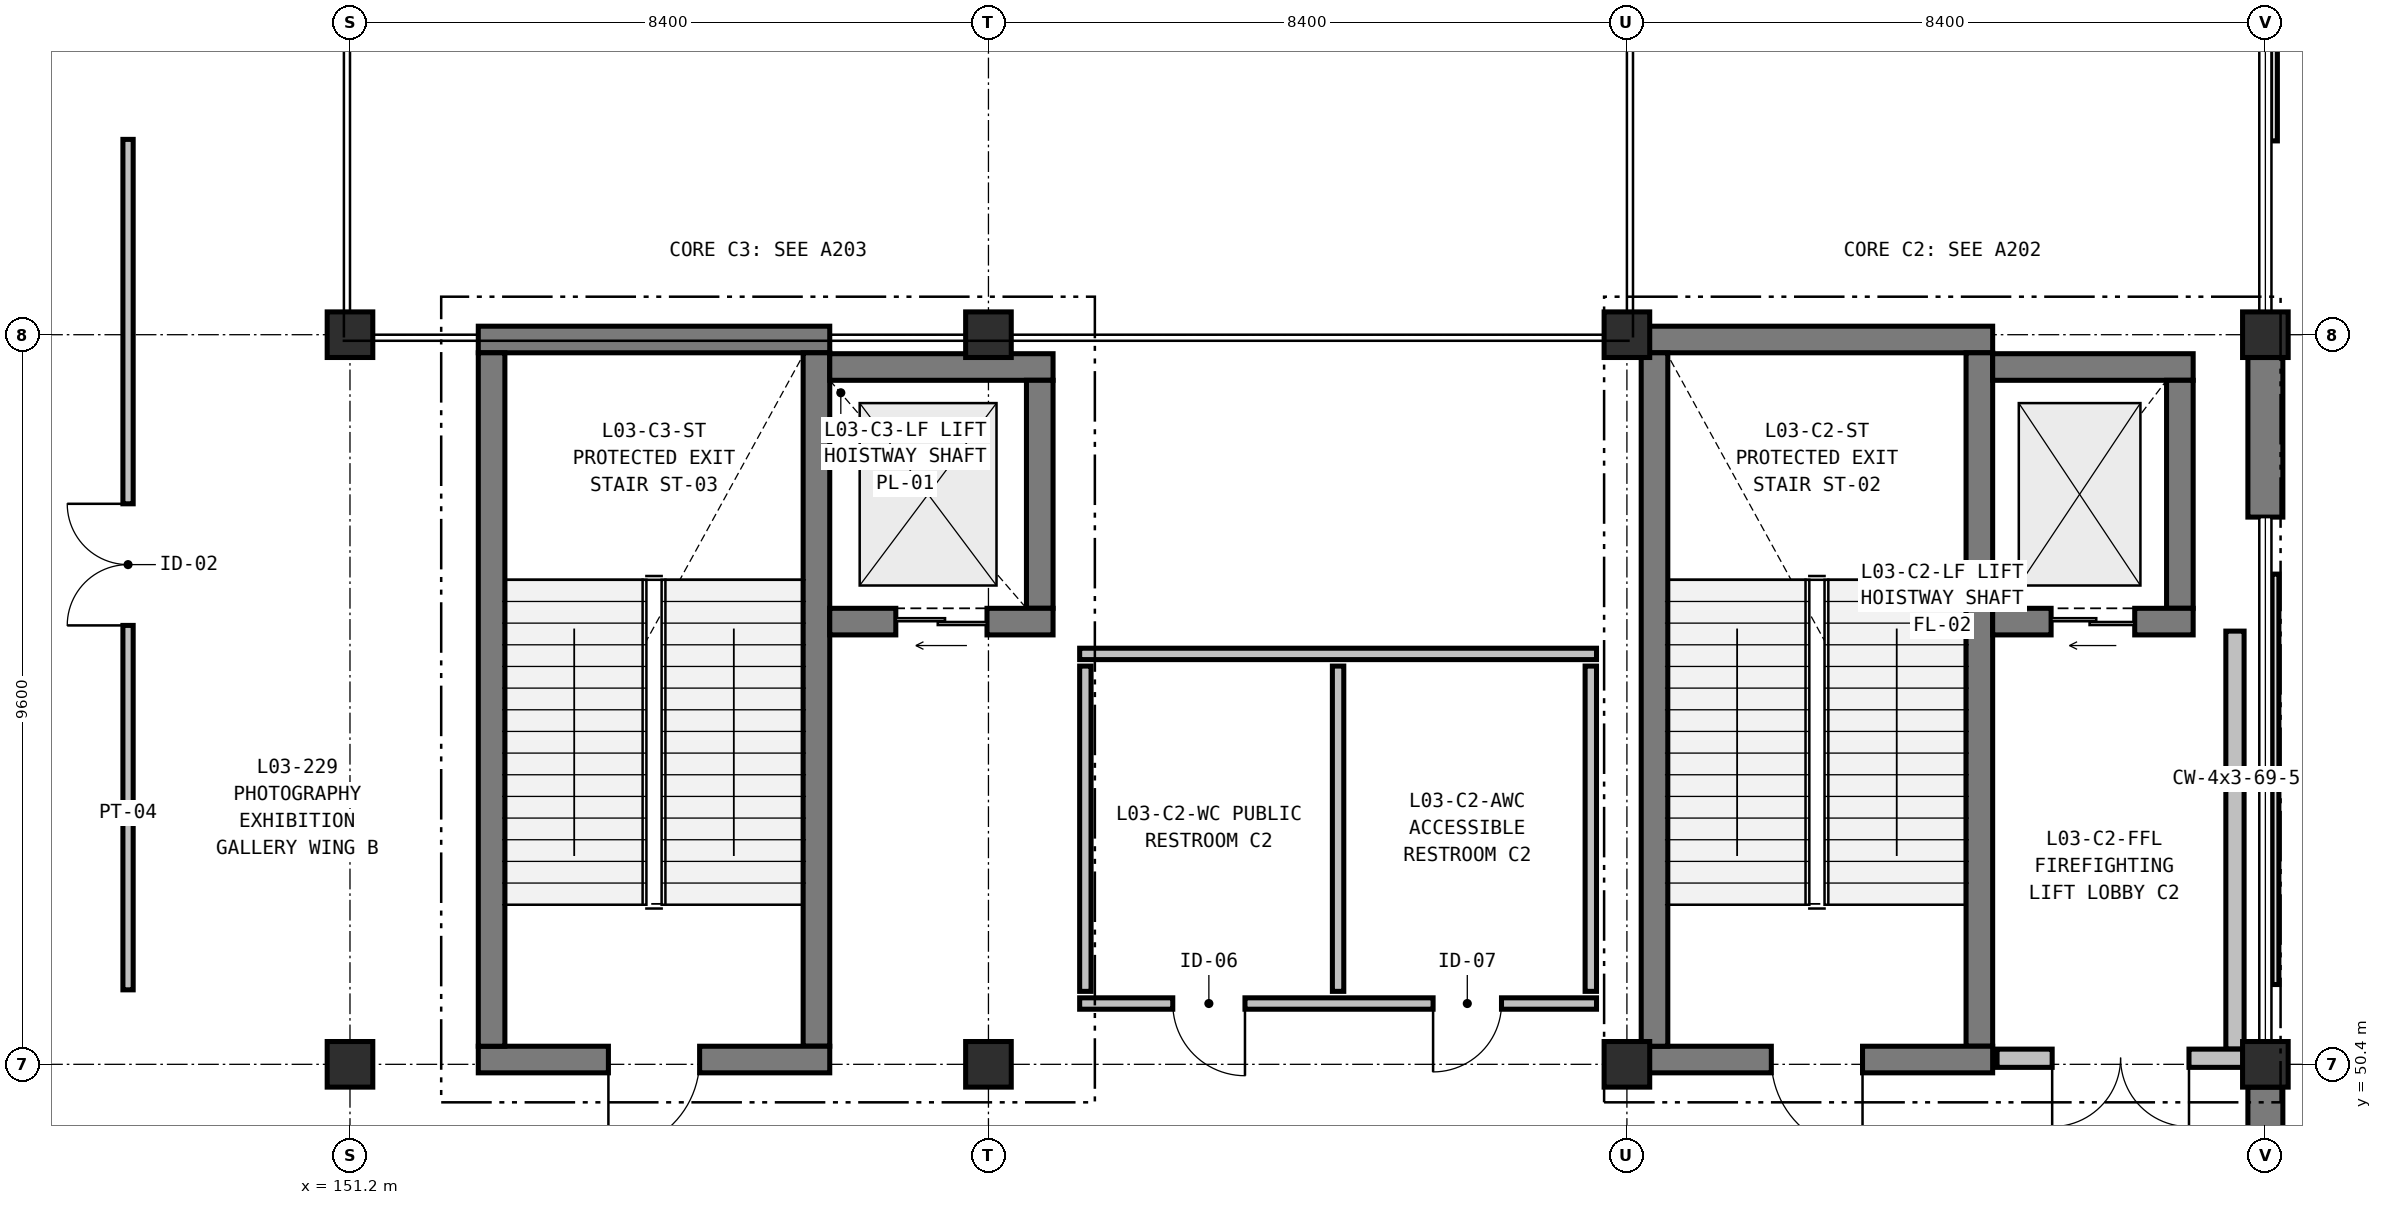
"""IFC4 building model, lengths in metres.
Left out: names, types, materials, properties, quantities, classifications, styles, units other than length and angle.
Written with IfcOpenShell. Run it as: python <this file> out.ifc"""

import sys

from ifc_helpers import new_model, si_unit, direction, frame, frame_2d, origin, origin_2d, place, context, subcontext, project, spatial, rectangle, extrude, element, fill, save


model = new_model("IFC4")
c1 = context("Model", 3, precision=1e-05, world=origin(), true_north=direction((0.0, 1.0)))
c2 = subcontext(c1, "Body", "Model", "MODEL_VIEW")
j1 = project(units=[si_unit("LENGTHUNIT", "METRE"), si_unit("PLANEANGLEUNIT", "RADIAN")], contexts=[c1])
p1 = place(None, origin())
s1 = spatial("IfcSite", under=j1, at=p1, CompositionType="ELEMENT")
p2 = place(p1, origin())
s2 = spatial("IfcBuilding", under=s1, at=p2, CompositionType="ELEMENT")
p3 = place(p2, frame((0.0, 0.0, 16.8)))
s3 = spatial("IfcBuildingStorey", under=s2, at=p3, CompositionType="ELEMENT", Elevation=16.8)
for number, where, z_axis, x_axis in (
    (1, (151.2, 50.4, 0.0), (0.0, 0.0, 1.0), (1.0, 0.0, 0.0)),
    (2, (151.2, 60.0, 0.0), (0.0, 0.0, 1.0), (1.0, 0.0, 0.0)),
    (3, (159.6, 50.4, 0.0), (0.0, 0.0, 1.0), (1.0, 0.0, 0.0)),
    (4, (159.6, 60.0, 0.0), (0.0, 0.0, 1.0), (1.0, 0.0, 0.0)),
    (5, (168.0, 50.4, 0.0), (0.0, 0.0, 1.0), (1.0, 0.0, 0.0)),
    (6, (168.0, 60.0, 0.0), (0.0, 0.0, 1.0), (1.0, 0.0, 0.0)),
    (7, (176.4, 50.4, 0.0), (0.0, 0.0, 1.0), (1.0, 0.0, 0.0)),
    (8, (176.4, 60.0, 0.0), (0.0, 0.0, 1.0), (1.0, 0.0, 0.0)),
):
    element("IfcColumn", number, at=place(p3, frame(where, z_axis=z_axis, x_axis=x_axis)), inside=s3, PredefinedType="COLUMN", context=c2, shape_type="SweptSolid", body=[
        extrude(rectangle(XDim=0.6, YDim=0.6, at=origin_2d()), origin(), (0.0, 0.0, 1.0), 5.4),
    ])
p4 = place(p3, frame((176.4, 59.7, 0.0), z_axis=(0.0, 0.0, 1.0), x_axis=(0.0, -1.0, 0.0)))
e9 = element("IfcWall", 9, at=p4, inside=s3, PredefinedType="SOLIDWALL", context=c2, shape_type="SweptSolid", body=[
    extrude(rectangle(XDim=2.1, YDim=0.46, at=frame_2d((1.05, 0.0))), origin(), (0.0, 0.0, 1.0), 5.1),
])
p5 = place(p3, frame((176.4, 50.1, 0.0), z_axis=(0.0, 0.0, 1.0), x_axis=(0.0, -1.0, 0.0)))
e10 = element("IfcWall", 10, at=p5, inside=s3, PredefinedType="SOLIDWALL", context=c2, shape_type="SweptSolid", body=[
    extrude(rectangle(XDim=4.2, YDim=0.46, at=frame_2d((2.1, 0.0))), origin(), (0.0, 0.0, 1.0), 5.1),
])
p6 = place(p3, frame((168.188, 59.937, 0.0), z_axis=(0.0, 0.0, 1.0), x_axis=(1.0, 0.0, 0.0)))
e11 = element("IfcWall", 11, at=p6, inside=s3, PredefinedType="SHEAR", context=c2, shape_type="SweptSolid", body=[
    extrude(rectangle(XDim=4.624, YDim=0.35, at=frame_2d((2.312, 0.0))), origin(), (0.0, 0.0, 1.0), 5.1),
])
p7 = place(p3, frame((172.637, 59.762, 0.0), z_axis=(0.0, 0.0, 1.0), x_axis=(0.0, -1.0, 0.0)))
e12 = element("IfcWall", 12, at=p7, inside=s3, PredefinedType="SHEAR", context=c2, shape_type="SweptSolid", body=[
    extrude(rectangle(XDim=9.124, YDim=0.35, at=frame_2d((4.562, 0.0))), origin(), (0.0, 0.0, 1.0), 5.1),
])
p8 = place(p3, frame((172.812, 50.463, 0.0), z_axis=(0.0, 0.0, 1.0), x_axis=(-1.0, 0.0, 0.0)))
e13 = element("IfcWall", 13, at=p8, inside=s3, PredefinedType="SHEAR", context=c2, shape_type="SweptSolid", body=[
    extrude(rectangle(XDim=4.624, YDim=0.35, at=frame_2d((2.312, 0.0))), origin(), (0.0, 0.0, 1.0), 5.1),
])
p9 = place(p8, frame((1.712, 0.0, 0.0)))
e14 = element("IfcOpeningElement", 14, at=p9, cuts=e13, PredefinedType="OPENING", context=c2, shape_type="SweptSolid", body=[
    extrude(rectangle(XDim=1.2, YDim=2.2, at=frame_2d((0.6, 1.1))), frame((0.0, 0.185, 0.0), z_axis=(0.0, -1.0, 0.0), x_axis=(1.0, 0.0, 0.0)), (0.0, 0.0, 1.0), 0.37),
])
p10 = place(p3, frame((168.363, 50.638, 0.0), z_axis=(0.0, 0.0, 1.0), x_axis=(0.0, 1.0, 0.0)))
e15 = element("IfcWall", 15, at=p10, inside=s3, PredefinedType="SHEAR", context=c2, shape_type="SweptSolid", body=[
    extrude(rectangle(XDim=9.124, YDim=0.35, at=frame_2d((4.562, 0.0))), origin(), (0.0, 0.0, 1.0), 5.1),
])
p11 = place(p3, frame((172.812, 59.575, 0.0), z_axis=(0.0, 0.0, 1.0), x_axis=(1.0, 0.0, 0.0)))
e16 = element("IfcWall", 16, at=p11, inside=s3, PredefinedType="SHEAR", context=c2, shape_type="SweptSolid", body=[
    extrude(rectangle(XDim=2.638, YDim=0.35, at=frame_2d((1.319, 0.0))), origin(), (0.0, 0.0, 1.0), 5.1),
])
p12 = place(p3, frame((175.275, 59.4, 0.0), z_axis=(0.0, 0.0, 1.0), x_axis=(0.0, -1.0, 0.0)))
e17 = element("IfcWall", 17, at=p12, inside=s3, PredefinedType="SHEAR", context=c2, shape_type="SweptSolid", body=[
    extrude(rectangle(XDim=3.0, YDim=0.35, at=frame_2d((1.5, 0.0))), origin(), (0.0, 0.0, 1.0), 5.1),
])
p13 = place(p3, frame((175.45, 56.225, 0.0), z_axis=(0.0, 0.0, 1.0), x_axis=(-1.0, 0.0, 0.0)))
e18 = element("IfcWall", 18, at=p13, inside=s3, PredefinedType="SHEAR", context=c2, shape_type="SweptSolid", body=[
    extrude(rectangle(XDim=2.638, YDim=0.35, at=frame_2d((1.319, 0.0))), origin(), (0.0, 0.0, 1.0), 5.1),
])
p14 = place(p13, frame((0.769, 0.0, 0.0)))
e19 = element("IfcOpeningElement", 19, at=p14, cuts=e18, PredefinedType="OPENING", context=c2, shape_type="SweptSolid", body=[
    extrude(rectangle(XDim=1.1, YDim=2.2, at=frame_2d((0.55, 1.1))), frame((0.0, 0.185, 0.0), z_axis=(0.0, -1.0, 0.0), x_axis=(1.0, 0.0, 0.0)), (0.0, 0.0, 1.0), 0.37),
])
p15 = place(p3, frame((176.0, 56.1, 0.0), z_axis=(0.0, 0.0, 1.0), x_axis=(0.0, -1.0, 0.0)))
e20 = element("IfcWall", 20, at=p15, inside=s3, PredefinedType="PARTITIONING", context=c2, shape_type="SweptSolid", body=[
    extrude(rectangle(XDim=5.5, YDim=0.24, at=frame_2d((2.75, 0.0))), origin(), (0.0, 0.0, 1.0), 4.425),
])
p16 = place(p3, frame((176.12, 50.48, 0.0), z_axis=(0.0, 0.0, 1.0), x_axis=(-1.0, 0.0, 0.0)))
e21 = element("IfcWall", 21, at=p16, inside=s3, PredefinedType="PARTITIONING", context=c2, shape_type="SweptSolid", body=[
    extrude(rectangle(XDim=3.25, YDim=0.24, at=frame_2d((1.625, 0.0))), origin(), (0.0, 0.0, 1.0), 4.425),
])
p17 = place(p16, frame((0.725, 0.0, 0.0)))
e22 = element("IfcOpeningElement", 22, at=p17, cuts=e21, PredefinedType="OPENING", context=c2, shape_type="SweptSolid", body=[
    extrude(rectangle(XDim=1.8, YDim=2.25, at=frame_2d((0.9, 1.125))), frame((0.0, 0.13, 0.0), z_axis=(0.0, -1.0, 0.0), x_axis=(1.0, 0.0, 0.0)), (0.0, 0.0, 1.0), 0.26),
])
p18 = place(p3, frame((167.6, 51.2, 0.0), z_axis=(0.0, 0.0, 1.0), x_axis=(-1.0, 0.0, 0.0)))
e23 = element("IfcWall", 23, at=p18, inside=s3, PredefinedType="PARTITIONING", context=c2, shape_type="SweptSolid", body=[
    extrude(rectangle(XDim=6.8, YDim=0.15, at=frame_2d((3.4, 0.0))), origin(), (0.0, 0.0, 1.0), 5.1),
])
p19 = place(p18, frame((1.25, 0.0, 0.0)))
e24 = element("IfcOpeningElement", 24, at=p19, cuts=e23, PredefinedType="OPENING", context=c2, shape_type="SweptSolid", body=[
    extrude(rectangle(XDim=0.9, YDim=2.1, at=frame_2d((0.45, 1.05))), frame((0.0, 0.085, 0.0), z_axis=(0.0, -1.0, 0.0), x_axis=(1.0, 0.0, 0.0)), (0.0, 0.0, 1.0), 0.17),
])
p20 = place(p18, frame((4.625, 0.0, 0.0)))
e25 = element("IfcOpeningElement", 25, at=p20, cuts=e23, PredefinedType="OPENING", context=c2, shape_type="SweptSolid", body=[
    extrude(rectangle(XDim=0.95, YDim=2.15, at=frame_2d((0.475, 1.075))), frame((0.0, 0.085, 0.0), z_axis=(0.0, -1.0, 0.0), x_axis=(1.0, 0.0, 0.0)), (0.0, 0.0, 1.0), 0.17),
])
p21 = place(p3, frame((160.8, 55.8, 0.0), z_axis=(0.0, 0.0, 1.0), x_axis=(1.0, 0.0, 0.0)))
e26 = element("IfcWall", 26, at=p21, inside=s3, PredefinedType="PARTITIONING", context=c2, shape_type="SweptSolid", body=[
    extrude(rectangle(XDim=6.8, YDim=0.15, at=frame_2d((3.4, 0.0))), origin(), (0.0, 0.0, 1.0), 5.1),
])
for number, where, z_axis, x_axis in (
    (27, (160.875, 51.36, 0.0), (0.0, 0.0, 1.0), (0.0, 1.0, 0.0)),
    (28, (164.2, 51.36, 0.0), (0.0, 0.0, 1.0), (0.0, 1.0, 0.0)),
    (29, (167.525, 51.36, 0.0), (0.0, 0.0, 1.0), (0.0, 1.0, 0.0)),
):
    element("IfcWall", number, at=place(p3, frame(where, z_axis=z_axis, x_axis=x_axis)), inside=s3, PredefinedType="PARTITIONING", context=c2, shape_type="SweptSolid", body=[
        extrude(rectangle(XDim=4.28, YDim=0.15, at=frame_2d((2.14, 0.0))), origin(), (0.0, 0.0, 1.0), 5.1),
    ])
p22 = place(p3, frame((152.888, 59.937, 0.0), z_axis=(0.0, 0.0, 1.0), x_axis=(1.0, 0.0, 0.0)))
e30 = element("IfcWall", 30, at=p22, inside=s3, PredefinedType="SHEAR", context=c2, shape_type="SweptSolid", body=[
    extrude(rectangle(XDim=4.624, YDim=0.35, at=frame_2d((2.312, 0.0))), origin(), (0.0, 0.0, 1.0), 5.1),
])
p23 = place(p3, frame((157.337, 59.762, 0.0), z_axis=(0.0, 0.0, 1.0), x_axis=(0.0, -1.0, 0.0)))
e31 = element("IfcWall", 31, at=p23, inside=s3, PredefinedType="SHEAR", context=c2, shape_type="SweptSolid", body=[
    extrude(rectangle(XDim=9.124, YDim=0.35, at=frame_2d((4.562, 0.0))), origin(), (0.0, 0.0, 1.0), 5.1),
])
p24 = place(p3, frame((157.512, 50.463, 0.0), z_axis=(0.0, 0.0, 1.0), x_axis=(-1.0, 0.0, 0.0)))
e32 = element("IfcWall", 32, at=p24, inside=s3, PredefinedType="SHEAR", context=c2, shape_type="SweptSolid", body=[
    extrude(rectangle(XDim=4.624, YDim=0.35, at=frame_2d((2.312, 0.0))), origin(), (0.0, 0.0, 1.0), 5.1),
])
p25 = place(p24, frame((1.712, 0.0, 0.0)))
e33 = element("IfcOpeningElement", 33, at=p25, cuts=e32, PredefinedType="OPENING", context=c2, shape_type="SweptSolid", body=[
    extrude(rectangle(XDim=1.2, YDim=2.2, at=frame_2d((0.6, 1.1))), frame((0.0, 0.185, 0.0), z_axis=(0.0, -1.0, 0.0), x_axis=(1.0, 0.0, 0.0)), (0.0, 0.0, 1.0), 0.37),
])
p26 = place(p3, frame((153.063, 50.638, 0.0), z_axis=(0.0, 0.0, 1.0), x_axis=(0.0, 1.0, 0.0)))
e34 = element("IfcWall", 34, at=p26, inside=s3, PredefinedType="SHEAR", context=c2, shape_type="SweptSolid", body=[
    extrude(rectangle(XDim=9.124, YDim=0.35, at=frame_2d((4.562, 0.0))), origin(), (0.0, 0.0, 1.0), 5.1),
])
p27 = place(p3, frame((157.512, 59.575, 0.0), z_axis=(0.0, 0.0, 1.0), x_axis=(1.0, 0.0, 0.0)))
e35 = element("IfcWall", 35, at=p27, inside=s3, PredefinedType="SHEAR", context=c2, shape_type="SweptSolid", body=[
    extrude(rectangle(XDim=2.938, YDim=0.35, at=frame_2d((1.469, 0.0))), origin(), (0.0, 0.0, 1.0), 5.1),
])
p28 = place(p3, frame((160.275, 59.4, 0.0), z_axis=(0.0, 0.0, 1.0), x_axis=(0.0, -1.0, 0.0)))
e36 = element("IfcWall", 36, at=p28, inside=s3, PredefinedType="SHEAR", context=c2, shape_type="SweptSolid", body=[
    extrude(rectangle(XDim=3.0, YDim=0.35, at=frame_2d((1.5, 0.0))), origin(), (0.0, 0.0, 1.0), 5.1),
])
p29 = place(p3, frame((160.45, 56.225, 0.0), z_axis=(0.0, 0.0, 1.0), x_axis=(-1.0, 0.0, 0.0)))
e37 = element("IfcWall", 37, at=p29, inside=s3, PredefinedType="SHEAR", context=c2, shape_type="SweptSolid", body=[
    extrude(rectangle(XDim=2.938, YDim=0.35, at=frame_2d((1.469, 0.0))), origin(), (0.0, 0.0, 1.0), 5.1),
])
p30 = place(p29, frame((0.869, 0.0, 0.0)))
e38 = element("IfcOpeningElement", 38, at=p30, cuts=e37, PredefinedType="OPENING", context=c2, shape_type="SweptSolid", body=[
    extrude(rectangle(XDim=1.2, YDim=2.2, at=frame_2d((0.6, 1.1))), frame((0.0, 0.185, 0.0), z_axis=(0.0, -1.0, 0.0), x_axis=(1.0, 0.0, 0.0)), (0.0, 0.0, 1.0), 0.37),
])
p31 = place(p3, frame((148.28, 51.38, 0.0), z_axis=(0.0, 0.0, 1.0), x_axis=(0.0, 1.0, 0.0)))
e39 = element("IfcWall", 39, at=p31, inside=s3, PredefinedType="PARTITIONING", context=c2, shape_type="SweptSolid", body=[
    extrude(rectangle(XDim=11.19, YDim=0.135, at=frame_2d((5.595, 0.0))), origin(), (0.0, 0.0, 1.0), 4.425),
])
p32 = place(p31, frame((4.795, 0.0, 0.0)))
e40 = element("IfcOpeningElement", 40, at=p32, cuts=e39, PredefinedType="OPENING", context=c2, shape_type="SweptSolid", body=[
    extrude(rectangle(XDim=1.6, YDim=2.35, at=frame_2d((0.8, 1.175))), frame((0.0, 0.077, 0.0), z_axis=(0.0, -1.0, 0.0), x_axis=(1.0, 0.0, 0.0)), (0.0, 0.0, 1.0), 0.155),
])
p33 = place(p9, origin())
e41 = element("IfcDoor", 41, at=p33, inside=s3, OperationType="SINGLE_SWING_LEFT", PredefinedType="DOOR", context=c2, shape_type="SweptSolid", body=[
    extrude(rectangle(XDim=1.2, YDim=2.2, at=frame_2d((0.6, 1.1))), frame((0.0, 0.025, 0.0), z_axis=(0.0, -1.0, 0.0), x_axis=(1.0, 0.0, 0.0)), (0.0, 0.0, 1.0), 0.05),
])
fill(e14, e41)
p34 = place(p14, origin())
e42 = element("IfcDoor", 42, at=p34, inside=s3, OperationType="DOUBLE_DOOR_SLIDING", PredefinedType="DOOR", context=c2, shape_type="SweptSolid", body=[
    extrude(rectangle(XDim=1.1, YDim=2.2, at=frame_2d((0.55, 1.1))), frame((0.0, 0.025, 0.0), z_axis=(0.0, -1.0, 0.0), x_axis=(1.0, 0.0, 0.0)), (0.0, 0.0, 1.0), 0.05),
])
fill(e19, e42)
p35 = place(p17, origin())
e43 = element("IfcDoor", 43, at=p35, inside=s3, OperationType="DOUBLE_DOOR_SINGLE_SWING", PredefinedType="DOOR", context=c2, shape_type="SweptSolid", body=[
    extrude(rectangle(XDim=1.8, YDim=2.25, at=frame_2d((0.9, 1.125))), frame((0.0, 0.025, 0.0), z_axis=(0.0, -1.0, 0.0), x_axis=(1.0, 0.0, 0.0)), (0.0, 0.0, 1.0), 0.05),
])
fill(e22, e43)
p36 = place(p19, origin())
e44 = element("IfcDoor", 44, at=p36, inside=s3, OperationType="SINGLE_SWING_RIGHT", PredefinedType="DOOR", context=c2, shape_type="SweptSolid", body=[
    extrude(rectangle(XDim=0.9, YDim=2.1, at=frame_2d((0.45, 1.05))), frame((0.0, 0.025, 0.0), z_axis=(0.0, -1.0, 0.0), x_axis=(1.0, 0.0, 0.0)), (0.0, 0.0, 1.0), 0.05),
])
fill(e24, e44)
p37 = place(p20, origin())
e45 = element("IfcDoor", 45, at=p37, inside=s3, OperationType="SINGLE_SWING_LEFT", PredefinedType="DOOR", context=c2, shape_type="SweptSolid", body=[
    extrude(rectangle(XDim=0.95, YDim=2.15, at=frame_2d((0.475, 1.075))), frame((0.0, 0.025, 0.0), z_axis=(0.0, -1.0, 0.0), x_axis=(1.0, 0.0, 0.0)), (0.0, 0.0, 1.0), 0.05),
])
fill(e25, e45)
p38 = place(p25, origin())
e46 = element("IfcDoor", 46, at=p38, inside=s3, OperationType="SINGLE_SWING_RIGHT", PredefinedType="DOOR", context=c2, shape_type="SweptSolid", body=[
    extrude(rectangle(XDim=1.2, YDim=2.2, at=frame_2d((0.6, 1.1))), frame((0.0, 0.025, 0.0), z_axis=(0.0, -1.0, 0.0), x_axis=(1.0, 0.0, 0.0)), (0.0, 0.0, 1.0), 0.05),
])
fill(e33, e46)
p39 = place(p30, origin())
e47 = element("IfcDoor", 47, at=p39, inside=s3, OperationType="DOUBLE_DOOR_SLIDING", PredefinedType="DOOR", context=c2, shape_type="SweptSolid", body=[
    extrude(rectangle(XDim=1.2, YDim=2.2, at=frame_2d((0.6, 1.1))), frame((0.0, 0.025, 0.0), z_axis=(0.0, -1.0, 0.0), x_axis=(1.0, 0.0, 0.0)), (0.0, 0.0, 1.0), 0.05),
])
fill(e38, e47)
p40 = place(p32, origin())
e48 = element("IfcDoor", 48, at=p40, inside=s3, OperationType="DOUBLE_DOOR_SINGLE_SWING", PredefinedType="DOOR", context=c2, shape_type="SweptSolid", body=[
    extrude(rectangle(XDim=1.6, YDim=2.35, at=frame_2d((0.8, 1.175))), frame((0.0, 0.025, 0.0), z_axis=(0.0, -1.0, 0.0), x_axis=(1.0, 0.0, 0.0)), (0.0, 0.0, 1.0), 0.05),
])
fill(e40, e48)
save(model, sys.argv[1])
